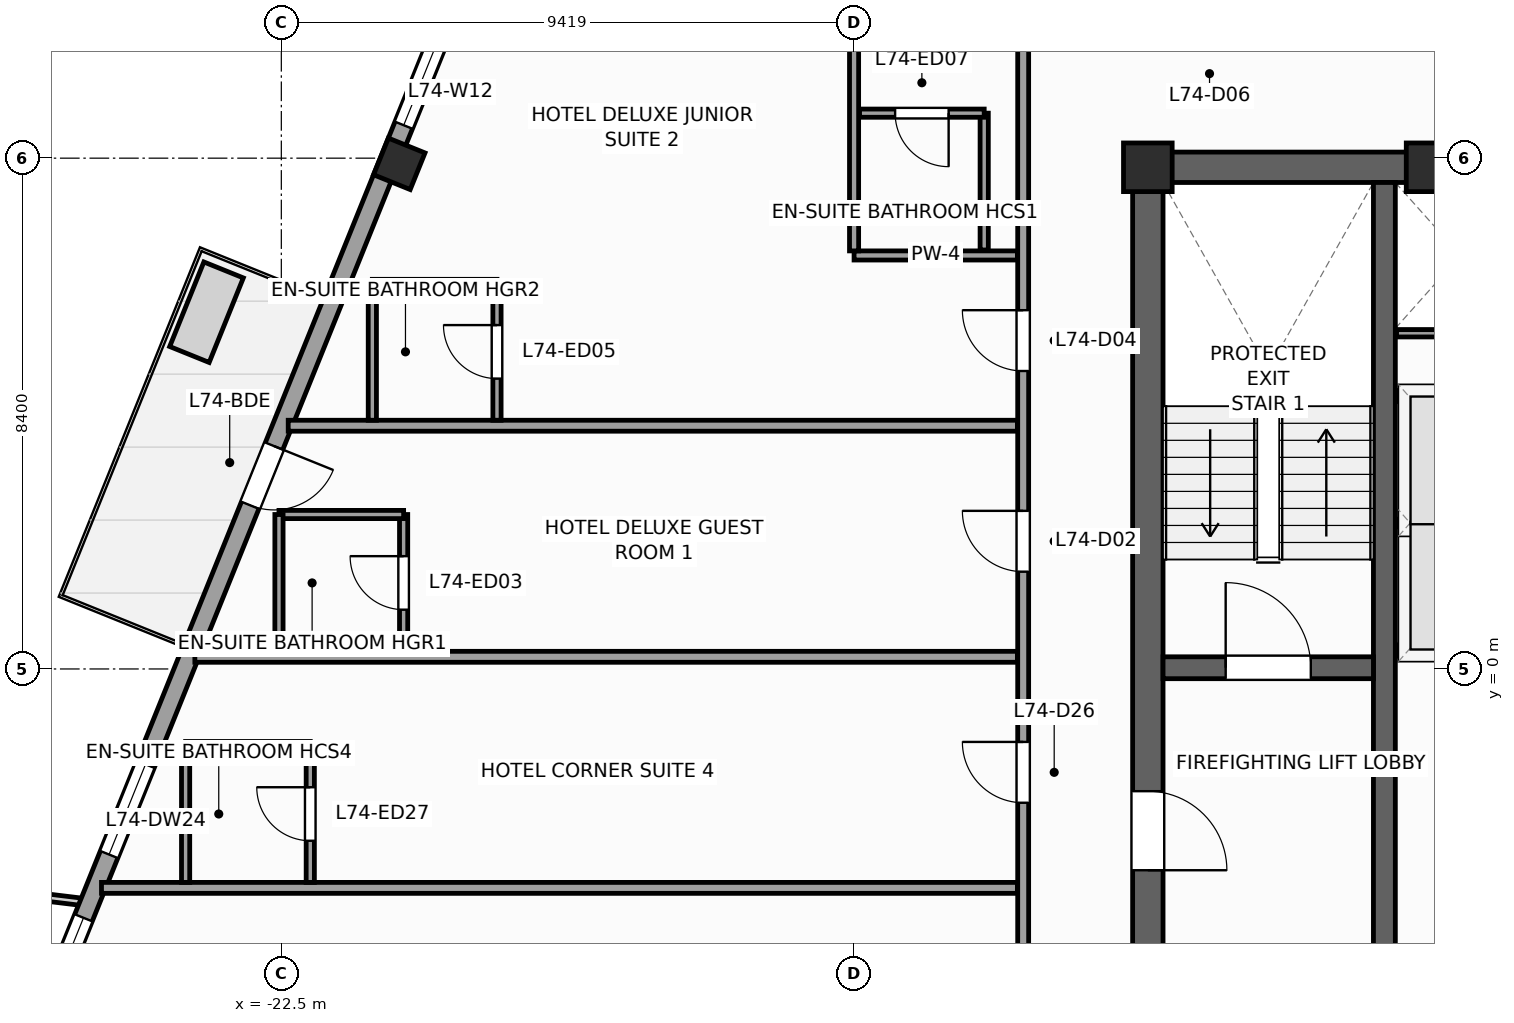
"""IFC4 building model, lengths in metres.
Left out: names, types, materials, properties, quantities, classifications, styles, units other than length and angle.
Written with IfcOpenShell. Run it as: python <this file> out.ifc"""

import sys

from ifc_helpers import new_model, si_unit, direction, frame, frame_2d, origin, origin_2d, place, context, subcontext, project, spatial, rectangle, extrude, source, transform, mapped, element, fill, save


model = new_model("IFC4")
c1 = context("Model", 3, precision=1e-05, world=origin(), true_north=direction((0.0, 1.0)))
c2 = subcontext(c1, "Body", "Model", "MODEL_VIEW")
j1 = project(units=[si_unit("LENGTHUNIT", "METRE"), si_unit("PLANEANGLEUNIT", "RADIAN")], contexts=[c1])
p1 = place(None, origin())
s1 = spatial("IfcSite", under=j1, at=p1, CompositionType="ELEMENT")
p2 = place(p1, origin())
s2 = spatial("IfcBuilding", under=s1, at=p2, CompositionType="ELEMENT")
p3 = place(p2, frame((0.0, 0.0, 301.2)))
s3 = spatial("IfcBuildingStorey", under=s2, at=p3, CompositionType="ELEMENT", Elevation=301.2)
p4 = place(p3, frame((-8.5, 8.25, 0.0), z_axis=(0.0, 0.0, 1.0), x_axis=(1.0, 0.0, 0.0)))
e1 = element("IfcWall", 1, at=p4, inside=s3, PredefinedType="SHEAR", context=c2, shape_type="SweptSolid", body=[
    extrude(rectangle(XDim=17.0, YDim=0.5, at=frame_2d((8.5, 0.0))), origin(), (0.0, 0.0, 1.0), 3.6),
])
p5 = place(p3, frame((-8.25, -8.0, 0.0), z_axis=(0.0, 0.0, 1.0), x_axis=(0.0, 1.0, 0.0)))
e2 = element("IfcWall", 2, at=p5, inside=s3, PredefinedType="SHEAR", context=c2, shape_type="SweptSolid", body=[
    extrude(rectangle(XDim=16.0, YDim=0.5, at=frame_2d((8.0, 0.0))), origin(), (0.0, 0.0, 1.0), 3.6),
])
p6 = place(p5, frame((4.69, 0.0, 0.0)))
e3 = element("IfcOpeningElement", 3, at=p6, cuts=e2, PredefinedType="OPENING", context=c2, shape_type="SweptSolid", body=[
    extrude(rectangle(XDim=1.3, YDim=2.2, at=frame_2d((0.65, 1.1))), frame((0.0, 0.26, 0.0), z_axis=(0.0, -1.0, 0.0), x_axis=(1.0, 0.0, 0.0)), (0.0, 0.0, 1.0), 0.52),
])
p7 = place(p3, frame((-4.36, -8.0, 0.0), z_axis=(0.0, 0.0, 1.0), x_axis=(0.0, 1.0, 0.0)))
e4 = element("IfcWall", 4, at=p7, inside=s3, PredefinedType="SHEAR", context=c2, shape_type="SweptSolid", body=[
    extrude(rectangle(XDim=16.0, YDim=0.36, at=frame_2d((8.0, 0.0))), origin(), (0.0, 0.0, 1.0), 3.6),
])
p8 = place(p3, frame((-8.0, 0.02, 0.0), z_axis=(0.0, 0.0, 1.0), x_axis=(1.0, 0.0, 0.0)))
e5 = element("IfcWall", 5, at=p8, inside=s3, PredefinedType="SHEAR", context=c2, shape_type="SweptSolid", body=[
    extrude(rectangle(XDim=3.46, YDim=0.36, at=frame_2d((1.73, 0.0))), origin(), (0.0, 0.0, 1.0), 3.6),
])
p9 = place(p8, frame((1.03, 0.0, 0.0)))
e6 = element("IfcOpeningElement", 6, at=p9, cuts=e5, PredefinedType="OPENING", context=c2, shape_type="SweptSolid", body=[
    extrude(rectangle(XDim=1.4, YDim=2.2, at=frame_2d((0.7, 1.1))), frame((0.0, 0.19, 0.0), z_axis=(0.0, -1.0, 0.0), x_axis=(1.0, 0.0, 0.0)), (0.0, 0.0, 1.0), 0.38),
])
m1 = source(origin(), c2, "Body", "SweptSolid", [
    extrude(rectangle(XDim=0.8, YDim=0.8, at=origin_2d()), origin(), (0.0, 0.0, 1.0), 3.6),
])
for number, where, z_axis, x_axis in (
    (7, (-8.25, 8.25, 0.0), (0.0, 0.0, 1.0), (1.0, 0.0, 0.0)),
    (8, (-3.6, 8.25, 0.0), (0.0, 0.0, 1.0), (1.0, 0.0, 0.0)),
):
    element("IfcColumn", number, at=place(p3, frame(where, z_axis=z_axis, x_axis=x_axis)), inside=s3, PredefinedType="PILASTER", context=c2, shape_type="MappedRepresentation", body=[
        mapped(m1, transform((0.0, 0.0, 0.0), scale=1.0)),
    ])
m2 = source(origin(), c2, "Body", "SweptSolid", [
    extrude(rectangle(XDim=0.65, YDim=0.65, at=origin_2d()), origin(), (0.0, 0.0, 1.0), 3.6),
])
p10 = place(p3, frame((-20.56, 8.307, 0.0), z_axis=(0.0, 0.0, 1.0), x_axis=(0.374606593416, 0.927183854567, 0.0)))
e9 = element("IfcColumn", 9, at=p10, inside=s3, PredefinedType="COLUMN", context=c2, shape_type="MappedRepresentation", body=[
    mapped(m2, transform((0.0, 0.0, 0.0), scale=1.0)),
])
p11 = place(p3, frame((-14.479, 23.813, 0.0), z_axis=(0.0, 0.0, 1.0), x_axis=(-0.374609557019, -0.927182657188, 0.0)))
e10 = element("IfcWall", 10, at=p11, inside=s3, PredefinedType="STANDARD", context=c2, shape_type="SweptSolid", body=[
    extrude(rectangle(XDim=33.31, YDim=0.31, at=frame_2d((16.655, 0.0))), origin(), (0.0, 0.0, 1.0), 2.75),
])
p12 = place(p11, frame((21.73, 0.0, 0.0)))
e11 = element("IfcOpeningElement", 11, at=p12, cuts=e10, PredefinedType="OPENING", context=c2, shape_type="SweptSolid", body=[
    extrude(rectangle(XDim=1.05, YDim=2.25, at=frame_2d((0.525, 1.125))), frame((0.0, 0.165, 0.0), z_axis=(0.0, -1.0, 0.0), x_axis=(1.0, 0.0, 0.0)), (0.0, 0.0, 1.0), 0.33),
])
p13 = place(p11, frame((3.197, 0.0, 0.47)))
e12 = element("IfcOpeningElement", 12, at=p13, cuts=e10, PredefinedType="OPENING", context=c2, shape_type="SweptSolid", body=[
    extrude(rectangle(XDim=1.6, YDim=2.1, at=frame_2d((0.8, 1.05))), frame((0.0, 0.165, 0.0), z_axis=(0.0, -1.0, 0.0), x_axis=(1.0, 0.0, 0.0)), (0.0, 0.0, 1.0), 0.33),
])
p14 = place(p11, frame((8.86, 0.0, 0.47)))
e13 = element("IfcOpeningElement", 13, at=p14, cuts=e10, PredefinedType="OPENING", context=c2, shape_type="SweptSolid", body=[
    extrude(rectangle(XDim=1.6, YDim=2.1, at=frame_2d((0.8, 1.05))), frame((0.0, 0.165, 0.0), z_axis=(0.0, -1.0, 0.0), x_axis=(1.0, 0.0, 0.0)), (0.0, 0.0, 1.0), 0.33),
])
p15 = place(p11, frame((14.439, 0.0, 0.47)))
e14 = element("IfcOpeningElement", 14, at=p15, cuts=e10, PredefinedType="OPENING", context=c2, shape_type="SweptSolid", body=[
    extrude(rectangle(XDim=1.6, YDim=2.1, at=frame_2d((0.8, 1.05))), frame((0.0, 0.165, 0.0), z_axis=(0.0, -1.0, 0.0), x_axis=(1.0, 0.0, 0.0)), (0.0, 0.0, 1.0), 0.33),
])
p16 = place(p11, frame((30.097, 0.0, 0.47)))
e15 = element("IfcOpeningElement", 15, at=p16, cuts=e10, PredefinedType="OPENING", context=c2, shape_type="SweptSolid", body=[
    extrude(rectangle(XDim=1.6, YDim=2.1, at=frame_2d((0.8, 1.05))), frame((0.0, 0.165, 0.0), z_axis=(0.0, -1.0, 0.0), x_axis=(1.0, 0.0, 0.0)), (0.0, 0.0, 1.0), 0.33),
])
p17 = place(p11, frame((27.374, 0.0, 0.47)))
e16 = element("IfcOpeningElement", 16, at=p17, cuts=e10, PredefinedType="OPENING", context=c2, shape_type="SweptSolid", body=[
    extrude(rectangle(XDim=1.6, YDim=2.1, at=frame_2d((0.8, 1.05))), frame((0.0, 0.165, 0.0), z_axis=(0.0, -1.0, 0.0), x_axis=(1.0, 0.0, 0.0)), (0.0, 0.0, 1.0), 0.33),
])
for number, where, z_axis, x_axis in (
    (17, (-4.17, 0.3, 0.0), (0.0, 0.0, 1.0), (1.0, 0.0, 0.0)),
    (18, (-4.17, 4.49, 0.0), (0.0, 0.0, 1.0), (1.0, 0.0, 0.0)),
):
    element("IfcWall", number, at=place(p3, frame(where, z_axis=z_axis, x_axis=x_axis)), inside=s3, PredefinedType="PARTITIONING", context=c2, shape_type="SweptSolid", body=[
        extrude(rectangle(XDim=2.28, YDim=0.18, at=frame_2d((1.14, 0.0))), origin(), (0.0, 0.0, 1.0), 3.35),
    ])
p18 = place(p3, frame((-4.16, 2.4, 0.0), z_axis=(0.0, 0.0, 1.0), x_axis=(1.0, 0.0, 0.0)))
e19 = element("IfcWall", 19, at=p18, inside=s3, PredefinedType="PARTITIONING", context=c2, shape_type="SweptSolid", body=[
    extrude(rectangle(XDim=2.26, YDim=0.12, at=frame_2d((1.13, 0.0))), origin(), (0.0, 0.0, 1.0), 3.35),
])
p19 = place(p3, frame((-4.16, 5.52, 0.0), z_axis=(0.0, 0.0, 1.0), x_axis=(1.0, 0.0, 0.0)))
e20 = element("IfcWall", 20, at=p19, inside=s3, PredefinedType="PARTITIONING", context=c2, shape_type="SweptSolid", body=[
    extrude(rectangle(XDim=2.1, YDim=0.12, at=frame_2d((1.05, 0.0))), origin(), (0.0, 0.0, 1.0), 3.35),
])
p20 = place(p3, frame((-10.3, -12.35, 0.0), z_axis=(0.0, 0.0, 1.0), x_axis=(0.0, 1.0, 0.0)))
e21 = element("IfcWall", 21, at=p20, inside=s3, PredefinedType="PARTITIONING", context=c2, shape_type="SweptSolid", body=[
    extrude(rectangle(XDim=22.55, YDim=0.18, at=frame_2d((11.275, 0.0))), origin(), (0.0, 0.0, 1.0), 3.35),
])
p21 = place(p20, frame((13.95, 0.0, 0.0)))
e22 = element("IfcOpeningElement", 22, at=p21, cuts=e21, PredefinedType="OPENING", context=c2, shape_type="SweptSolid", body=[
    extrude(rectangle(XDim=1.0, YDim=2.15, at=frame_2d((0.5, 1.075))), frame((0.0, 0.1, 0.0), z_axis=(0.0, -1.0, 0.0), x_axis=(1.0, 0.0, 0.0)), (0.0, 0.0, 1.0), 0.2),
])
p22 = place(p20, frame((17.25, 0.0, 0.0)))
e23 = element("IfcOpeningElement", 23, at=p22, cuts=e21, PredefinedType="OPENING", context=c2, shape_type="SweptSolid", body=[
    extrude(rectangle(XDim=1.0, YDim=2.15, at=frame_2d((0.5, 1.075))), frame((0.0, 0.1, 0.0), z_axis=(0.0, -1.0, 0.0), x_axis=(1.0, 0.0, 0.0)), (0.0, 0.0, 1.0), 0.2),
])
p23 = place(p20, frame((6.65, 0.0, 0.0)))
e24 = element("IfcOpeningElement", 24, at=p23, cuts=e21, PredefinedType="OPENING", context=c2, shape_type="SweptSolid", body=[
    extrude(rectangle(XDim=1.0, YDim=2.15, at=frame_2d((0.5, 1.075))), frame((0.0, 0.1, 0.0), z_axis=(0.0, -1.0, 0.0), x_axis=(1.0, 0.0, 0.0)), (0.0, 0.0, 1.0), 0.2),
])
p24 = place(p20, frame((10.15, 0.0, 0.0)))
e25 = element("IfcOpeningElement", 25, at=p24, cuts=e21, PredefinedType="OPENING", context=c2, shape_type="SweptSolid", body=[
    extrude(rectangle(XDim=1.0, YDim=2.15, at=frame_2d((0.5, 1.075))), frame((0.0, 0.1, 0.0), z_axis=(0.0, -1.0, 0.0), x_axis=(1.0, 0.0, 0.0)), (0.0, 0.0, 1.0), 0.2),
])
p25 = place(p3, frame((-10.395, -3.6, 0.0), z_axis=(0.0, 0.0, 1.0), x_axis=(-1.0, 0.0, 0.0)))
e26 = element("IfcWall", 26, at=p25, inside=s3, PredefinedType="PARTITIONING", context=c2, shape_type="SweptSolid", body=[
    extrude(rectangle(XDim=15.062, YDim=0.18, at=frame_2d((7.531, 0.0))), origin(), (0.0, 0.0, 1.0), 3.35),
])
p26 = place(p3, frame((-10.395, 0.2, 0.0), z_axis=(0.0, 0.0, 1.0), x_axis=(-1.0, 0.0, 0.0)))
e27 = element("IfcWall", 27, at=p26, inside=s3, PredefinedType="PARTITIONING", context=c2, shape_type="SweptSolid", body=[
    extrude(rectangle(XDim=13.527, YDim=0.18, at=frame_2d((6.763, 0.0))), origin(), (0.0, 0.0, 1.0), 3.35),
])
p27 = place(p3, frame((-10.395, 4.0, 0.0), z_axis=(0.0, 0.0, 1.0), x_axis=(-1.0, 0.0, 0.0)))
e28 = element("IfcWall", 28, at=p27, inside=s3, PredefinedType="PARTITIONING", context=c2, shape_type="SweptSolid", body=[
    extrude(rectangle(XDim=11.992, YDim=0.18, at=frame_2d((5.996, 0.0))), origin(), (0.0, 0.0, 1.0), 3.35),
])
p28 = place(p3, frame((-10.395, 6.8, 0.0), z_axis=(0.0, 0.0, 1.0), x_axis=(-1.0, 0.0, 0.0)))
e29 = element("IfcWall", 29, at=p28, inside=s3, PredefinedType="PARTITIONING", context=c2, shape_type="SweptSolid", body=[
    extrude(rectangle(XDim=2.686, YDim=0.15, at=frame_2d((1.343, 0.0))), origin(), (0.0, 0.0, 1.0), 3.35),
])
p29 = place(p3, frame((-13.081, 6.875, 0.0), z_axis=(0.0, 0.0, 1.0), x_axis=(0.0, 1.0, 0.0)))
e30 = element("IfcWall", 30, at=p29, inside=s3, PredefinedType="PARTITIONING", context=c2, shape_type="SweptSolid", body=[
    extrude(rectangle(XDim=15.942, YDim=0.15, at=frame_2d((7.971, 0.0))), origin(), (0.0, 0.0, 1.0), 2.45),
])
p30 = place(p3, frame((-20.489, 0.29, 0.0), z_axis=(0.0, 0.0, 1.0), x_axis=(0.0, 1.0, 0.0)))
e31 = element("IfcWall", 31, at=p30, inside=s3, PredefinedType="PARTITIONING", context=c2, shape_type="SweptSolid", body=[
    extrude(rectangle(XDim=2.25, YDim=0.135, at=frame_2d((1.125, 0.0))), origin(), (0.0, 0.0, 1.0), 3.35),
])
p31 = place(p30, frame((0.685, 0.0, 0.0)))
e32 = element("IfcOpeningElement", 32, at=p31, cuts=e31, PredefinedType="OPENING", context=c2, shape_type="SweptSolid", body=[
    extrude(rectangle(XDim=0.88, YDim=2.1, at=frame_2d((0.44, 1.05))), frame((0.0, 0.078, 0.0), z_axis=(0.0, -1.0, 0.0), x_axis=(1.0, 0.0, 0.0)), (0.0, 0.0, 1.0), 0.155),
])
p32 = place(p3, frame((-22.539, 2.54, 0.0), z_axis=(0.0, 0.0, 1.0), x_axis=(1.0, 0.0, 0.0)))
e33 = element("IfcWall", 33, at=p32, inside=s3, PredefinedType="PARTITIONING", context=c2, shape_type="SweptSolid", body=[
    extrude(rectangle(XDim=2.05, YDim=0.135, at=frame_2d((1.025, 0.0))), origin(), (0.0, 0.0, 1.0), 3.35),
])
p33 = place(p3, frame((-22.539, 0.29, 0.0), z_axis=(0.0, 0.0, 1.0), x_axis=(0.0, 1.0, 0.0)))
e34 = element("IfcWall", 34, at=p33, inside=s3, PredefinedType="PARTITIONING", context=c2, shape_type="SweptSolid", body=[
    extrude(rectangle(XDim=2.25, YDim=0.135, at=frame_2d((1.125, 0.0))), origin(), (0.0, 0.0, 1.0), 3.35),
])
p34 = place(p3, frame((-18.953, 4.09, 0.0), z_axis=(0.0, 0.0, 1.0), x_axis=(0.0, 1.0, 0.0)))
e35 = element("IfcWall", 35, at=p34, inside=s3, PredefinedType="PARTITIONING", context=c2, shape_type="SweptSolid", body=[
    extrude(rectangle(XDim=2.25, YDim=0.135, at=frame_2d((1.125, 0.0))), origin(), (0.0, 0.0, 1.0), 3.35),
])
p35 = place(p34, frame((0.685, 0.0, 0.0)))
e36 = element("IfcOpeningElement", 36, at=p35, cuts=e35, PredefinedType="OPENING", context=c2, shape_type="SweptSolid", body=[
    extrude(rectangle(XDim=0.88, YDim=2.1, at=frame_2d((0.44, 1.05))), frame((0.0, 0.078, 0.0), z_axis=(0.0, -1.0, 0.0), x_axis=(1.0, 0.0, 0.0)), (0.0, 0.0, 1.0), 0.155),
])
p36 = place(p3, frame((-21.003, 6.34, 0.0), z_axis=(0.0, 0.0, 1.0), x_axis=(1.0, 0.0, 0.0)))
e37 = element("IfcWall", 37, at=p36, inside=s3, PredefinedType="PARTITIONING", context=c2, shape_type="SweptSolid", body=[
    extrude(rectangle(XDim=2.05, YDim=0.135, at=frame_2d((1.025, 0.0))), origin(), (0.0, 0.0, 1.0), 3.35),
])
for number, where, z_axis, x_axis in (
    (38, (-21.003, 4.09, 0.0), (0.0, 0.0, 1.0), (0.0, 1.0, 0.0)),
    (39, (-10.941, 6.89, 0.0), (0.0, 0.0, 1.0), (0.0, 1.0, 0.0)),
):
    element("IfcWall", number, at=place(p3, frame(where, z_axis=z_axis, x_axis=x_axis)), inside=s3, PredefinedType="PARTITIONING", context=c2, shape_type="SweptSolid", body=[
        extrude(rectangle(XDim=2.25, YDim=0.135, at=frame_2d((1.125, 0.0))), origin(), (0.0, 0.0, 1.0), 3.35),
    ])
p37 = place(p3, frame((-12.991, 9.14, 0.0), z_axis=(0.0, 0.0, 1.0), x_axis=(1.0, 0.0, 0.0)))
e40 = element("IfcWall", 40, at=p37, inside=s3, PredefinedType="PARTITIONING", context=c2, shape_type="SweptSolid", body=[
    extrude(rectangle(XDim=2.05, YDim=0.135, at=frame_2d((1.025, 0.0))), origin(), (0.0, 0.0, 1.0), 3.35),
])
p38 = place(p37, frame((0.585, 0.0, 0.0)))
e41 = element("IfcOpeningElement", 41, at=p38, cuts=e40, PredefinedType="OPENING", context=c2, shape_type="SweptSolid", body=[
    extrude(rectangle(XDim=0.88, YDim=2.1, at=frame_2d((0.44, 1.05))), frame((0.0, 0.078, 0.0), z_axis=(0.0, -1.0, 0.0), x_axis=(1.0, 0.0, 0.0)), (0.0, 0.0, 1.0), 0.155),
])
p39 = place(p3, frame((-22.024, -3.51, 0.0), z_axis=(0.0, 0.0, 1.0), x_axis=(0.0, 1.0, 0.0)))
e42 = element("IfcWall", 42, at=p39, inside=s3, PredefinedType="PARTITIONING", context=c2, shape_type="SweptSolid", body=[
    extrude(rectangle(XDim=2.25, YDim=0.135, at=frame_2d((1.125, 0.0))), origin(), (0.0, 0.0, 1.0), 3.35),
])
p40 = place(p39, frame((0.685, 0.0, 0.0)))
e43 = element("IfcOpeningElement", 43, at=p40, cuts=e42, PredefinedType="OPENING", context=c2, shape_type="SweptSolid", body=[
    extrude(rectangle(XDim=0.88, YDim=2.1, at=frame_2d((0.44, 1.05))), frame((0.0, 0.078, 0.0), z_axis=(0.0, -1.0, 0.0), x_axis=(1.0, 0.0, 0.0)), (0.0, 0.0, 1.0), 0.155),
])
p41 = place(p3, frame((-24.074, -1.26, 0.0), z_axis=(0.0, 0.0, 1.0), x_axis=(1.0, 0.0, 0.0)))
e44 = element("IfcWall", 44, at=p41, inside=s3, PredefinedType="PARTITIONING", context=c2, shape_type="SweptSolid", body=[
    extrude(rectangle(XDim=2.05, YDim=0.135, at=frame_2d((1.025, 0.0))), origin(), (0.0, 0.0, 1.0), 3.35),
])
p42 = place(p3, frame((-24.074, -3.51, 0.0), z_axis=(0.0, 0.0, 1.0), x_axis=(0.0, 1.0, 0.0)))
e45 = element("IfcWall", 45, at=p42, inside=s3, PredefinedType="PARTITIONING", context=c2, shape_type="SweptSolid", body=[
    extrude(rectangle(XDim=2.25, YDim=0.135, at=frame_2d((1.125, 0.0))), origin(), (0.0, 0.0, 1.0), 3.35),
])
m3 = source(origin(), c2, "Body", "SweptSolid", [
    extrude(rectangle(XDim=1.05, YDim=2.25, at=frame_2d((0.525, 1.125))), frame((0.0, 0.025, 0.0), z_axis=(0.0, -1.0, 0.0), x_axis=(1.0, 0.0, 0.0)), (0.0, 0.0, 1.0), 0.05),
])
p43 = place(p12, origin())
e46 = element("IfcDoor", 46, at=p43, inside=s3, OperationType="SINGLE_SWING_LEFT", PredefinedType="DOOR", context=c2, shape_type="MappedRepresentation", body=[
    mapped(m3, transform((0.0, 0.0, 0.0), scale=1.0)),
])
fill(e11, e46)
m4 = source(origin(), c2, "Body", "SweptSolid", [
    extrude(rectangle(XDim=1.6, YDim=2.1, at=frame_2d((0.8, 1.05))), frame((0.0, 0.03, 0.0), z_axis=(0.0, -1.0, 0.0), x_axis=(1.0, 0.0, 0.0)), (0.0, 0.0, 1.0), 0.06),
])
p44 = place(p15, origin())
e47 = element("IfcWindow", 47, at=p44, inside=s3, PartitioningType="SINGLE_PANEL", PredefinedType="WINDOW", context=c2, shape_type="MappedRepresentation", body=[
    mapped(m4, transform((0.0, 0.0, 0.0), scale=1.0)),
])
fill(e14, e47)
p45 = place(p16, origin())
e48 = element("IfcWindow", 48, at=p45, inside=s3, PartitioningType="SINGLE_PANEL", PredefinedType="WINDOW", context=c2, shape_type="MappedRepresentation", body=[
    mapped(m4, transform((0.0, 0.0, 0.0), scale=1.0)),
])
fill(e15, e48)
m5 = source(origin(), c2, "Body", "SweptSolid", [
    extrude(rectangle(XDim=1.4, YDim=2.2, at=frame_2d((0.7, 1.1))), frame((0.0, 0.025, 0.0), z_axis=(0.0, -1.0, 0.0), x_axis=(1.0, 0.0, 0.0)), (0.0, 0.0, 1.0), 0.05),
])
p46 = place(p9, origin())
e49 = element("IfcDoor", 49, at=p46, inside=s3, OperationType="SINGLE_SWING_LEFT", PredefinedType="DOOR", context=c2, shape_type="MappedRepresentation", body=[
    mapped(m5, transform((0.0, 0.0, 0.0), scale=1.0)),
])
fill(e6, e49)
m6 = source(origin(), c2, "Body", "SweptSolid", [
    extrude(rectangle(XDim=1.3, YDim=2.2, at=frame_2d((0.65, 1.1))), frame((0.0, 0.025, 0.0), z_axis=(0.0, -1.0, 0.0), x_axis=(1.0, 0.0, 0.0)), (0.0, 0.0, 1.0), 0.05),
])
p47 = place(p6, frame((1.3, 0.0, 0.0), z_axis=(0.0, 0.0, 1.0), x_axis=(-1.0, 0.0, 0.0)))
e50 = element("IfcDoor", 50, at=p47, inside=s3, OperationType="SINGLE_SWING_LEFT", PredefinedType="DOOR", context=c2, shape_type="MappedRepresentation", body=[
    mapped(m6, transform((0.0, 0.0, 0.0), scale=1.0)),
])
fill(e3, e50)
m7 = source(origin(), c2, "Body", "SweptSolid", [
    extrude(rectangle(XDim=1.0, YDim=2.15, at=frame_2d((0.5, 1.075))), frame((0.0, 0.025, 0.0), z_axis=(0.0, -1.0, 0.0), x_axis=(1.0, 0.0, 0.0)), (0.0, 0.0, 1.0), 0.05),
])
p48 = place(p21, origin())
e51 = element("IfcDoor", 51, at=p48, inside=s3, OperationType="SINGLE_SWING_RIGHT", PredefinedType="DOOR", context=c2, shape_type="MappedRepresentation", body=[
    mapped(m7, transform((0.0, 0.0, 0.0), scale=1.0)),
])
fill(e22, e51)
m8 = source(origin(), c2, "Body", "SweptSolid", [
    extrude(rectangle(XDim=0.88, YDim=2.1, at=frame_2d((0.44, 1.05))), frame((0.0, 0.025, 0.0), z_axis=(0.0, -1.0, 0.0), x_axis=(1.0, 0.0, 0.0)), (0.0, 0.0, 1.0), 0.05),
])
p49 = place(p31, origin())
e52 = element("IfcDoor", 52, at=p49, inside=s3, OperationType="SINGLE_SWING_RIGHT", PredefinedType="DOOR", context=c2, shape_type="MappedRepresentation", body=[
    mapped(m8, transform((0.0, 0.0, 0.0), scale=1.0)),
])
fill(e32, e52)
p50 = place(p22, origin())
e53 = element("IfcDoor", 53, at=p50, inside=s3, OperationType="SINGLE_SWING_RIGHT", PredefinedType="DOOR", context=c2, shape_type="MappedRepresentation", body=[
    mapped(m7, transform((0.0, 0.0, 0.0), scale=1.0)),
])
fill(e23, e53)
p51 = place(p35, origin())
e54 = element("IfcDoor", 54, at=p51, inside=s3, OperationType="SINGLE_SWING_RIGHT", PredefinedType="DOOR", context=c2, shape_type="MappedRepresentation", body=[
    mapped(m8, transform((0.0, 0.0, 0.0), scale=1.0)),
])
fill(e36, e54)
p52 = place(p38, frame((0.88, 0.0, 0.0), z_axis=(0.0, 0.0, 1.0), x_axis=(-1.0, 0.0, 0.0)))
e55 = element("IfcDoor", 55, at=p52, inside=s3, OperationType="SINGLE_SWING_RIGHT", PredefinedType="DOOR", context=c2, shape_type="MappedRepresentation", body=[
    mapped(m8, transform((0.0, 0.0, 0.0), scale=1.0)),
])
fill(e41, e55)
p53 = place(p24, origin())
e56 = element("IfcDoor", 56, at=p53, inside=s3, OperationType="SINGLE_SWING_RIGHT", PredefinedType="DOOR", context=c2, shape_type="MappedRepresentation", body=[
    mapped(m7, transform((0.0, 0.0, 0.0), scale=1.0)),
])
fill(e25, e56)
p54 = place(p40, origin())
e57 = element("IfcDoor", 57, at=p54, inside=s3, OperationType="SINGLE_SWING_RIGHT", PredefinedType="DOOR", context=c2, shape_type="MappedRepresentation", body=[
    mapped(m8, transform((0.0, 0.0, 0.0), scale=1.0)),
])
fill(e43, e57)
p55 = place(p17, origin())
e58 = element("IfcWindow", 58, at=p55, inside=s3, PartitioningType="SINGLE_PANEL", PredefinedType="WINDOW", context=c2, shape_type="MappedRepresentation", body=[
    mapped(m4, transform((0.0, 0.0, 0.0), scale=1.0)),
])
fill(e16, e58)
save(model, sys.argv[1])
